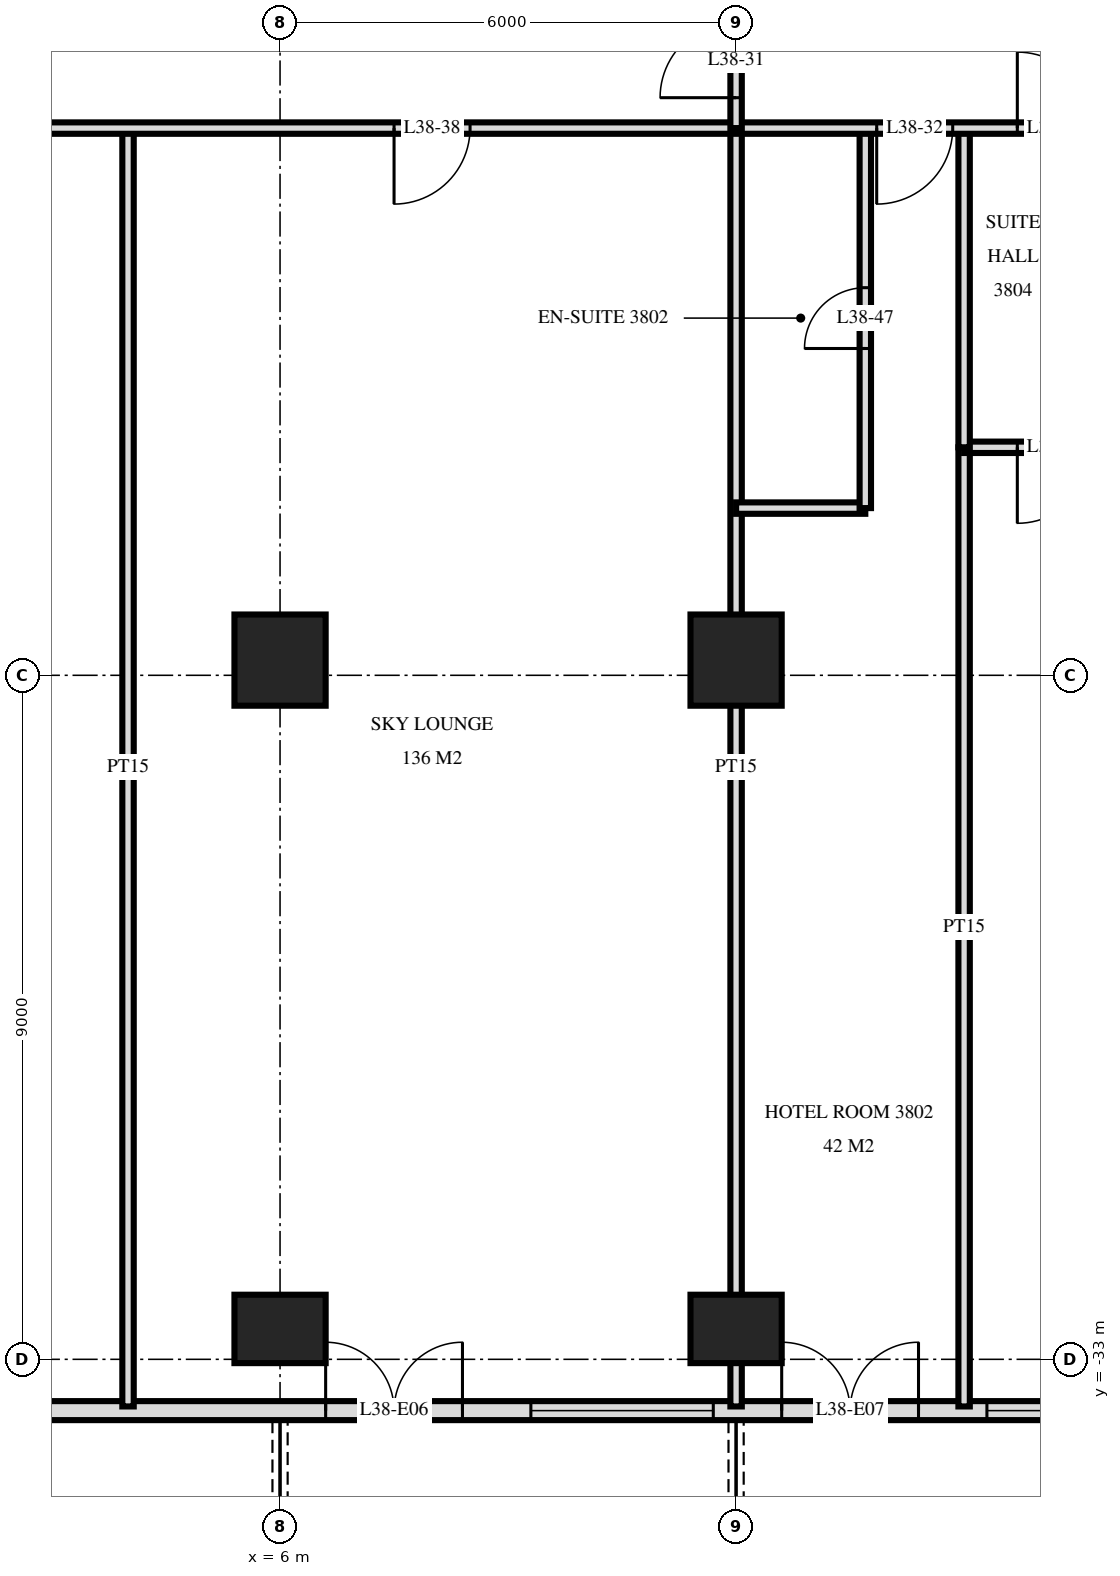
"""IFC4 building model, lengths in metres.
Left out: names, types, materials, properties, quantities, classifications, styles, units other than length and angle.
Written with IfcOpenShell. Run it as: python <this file> out.ifc"""

import sys

from ifc_helpers import new_model, si_unit, direction, frame, frame_2d, origin, origin_2d, place, context, subcontext, project, spatial, rectangle, extrude, element, fill, save


model = new_model("IFC4")
c1 = context("Model", 3, precision=1e-05, world=origin(), true_north=direction((0.0, 1.0)))
c2 = subcontext(c1, "Body", "Model", "MODEL_VIEW")
j1 = project(units=[si_unit("LENGTHUNIT", "METRE"), si_unit("PLANEANGLEUNIT", "RADIAN")], contexts=[c1])
p1 = place(None, origin())
s1 = spatial("IfcSite", under=j1, at=p1, CompositionType="ELEMENT")
p2 = place(p1, origin())
s2 = spatial("IfcBuilding", under=s1, at=p2, CompositionType="ELEMENT")
p3 = place(p2, frame((0.0, 0.0, 148.8)))
s3 = spatial("IfcBuildingStorey", under=s2, at=p3, CompositionType="ELEMENT", Elevation=148.8)
p4 = place(p3, frame((6.0, -32.6, 0.0), z_axis=(0.0, 0.0, 1.0), x_axis=(1.0, 0.0, 0.0)))
e1 = element("IfcColumn", 1, at=p4, inside=s3, PredefinedType="COLUMN", context=c2, shape_type="SweptSolid", body=[
    extrude(rectangle(XDim=1.2, YDim=0.9, at=origin_2d()), origin(), (0.0, 0.0, 1.0), 3.6),
])
p5 = place(p3, frame((6.0, -23.8, 0.0), z_axis=(0.0, 0.0, 1.0), x_axis=(1.0, 0.0, 0.0)))
e2 = element("IfcColumn", 2, at=p5, inside=s3, PredefinedType="COLUMN", context=c2, shape_type="SweptSolid", body=[
    extrude(rectangle(XDim=1.2, YDim=1.2, at=origin_2d()), origin(), (0.0, 0.0, 1.0), 3.6),
])
p6 = place(p3, frame((12.0, -32.6, 0.0), z_axis=(0.0, 0.0, 1.0), x_axis=(1.0, 0.0, 0.0)))
e3 = element("IfcColumn", 3, at=p6, inside=s3, PredefinedType="COLUMN", context=c2, shape_type="SweptSolid", body=[
    extrude(rectangle(XDim=1.2, YDim=0.9, at=origin_2d()), origin(), (0.0, 0.0, 1.0), 3.6),
])
p7 = place(p3, frame((12.0, -23.8, 0.0), z_axis=(0.0, 0.0, 1.0), x_axis=(1.0, 0.0, 0.0)))
e4 = element("IfcColumn", 4, at=p7, inside=s3, PredefinedType="COLUMN", context=c2, shape_type="SweptSolid", body=[
    extrude(rectangle(XDim=1.2, YDim=1.2, at=origin_2d()), origin(), (0.0, 0.0, 1.0), 3.6),
])
p8 = place(p3, frame((-23.675, -33.675, 0.0), z_axis=(0.0, 0.0, 1.0), x_axis=(1.0, 0.0, 0.0)))
e5 = element("IfcWall", 5, at=p8, inside=s3, PredefinedType="SOLIDWALL", context=c2, shape_type="SweptSolid", body=[
    extrude(rectangle(XDim=47.351, YDim=0.25, at=frame_2d((23.675, 0.0))), origin(), (0.0, 0.0, 1.0), 3.32),
])
p9 = place(p8, frame((3.425, 0.0, 0.0)))
e6 = element("IfcOpeningElement", 6, at=p9, cuts=e5, PredefinedType="OPENING", context=c2, shape_type="SweptSolid", body=[
    extrude(rectangle(XDim=1.8, YDim=2.4, at=frame_2d((0.9, 1.2))), frame((0.0, 0.135, 0.0), z_axis=(0.0, -1.0, 0.0), x_axis=(1.0, 0.0, 0.0)), (0.0, 0.0, 1.0), 0.27),
])
p10 = place(p8, frame((6.275, 0.0, 0.0)))
e7 = element("IfcOpeningElement", 7, at=p10, cuts=e5, PredefinedType="OPENING", context=c2, shape_type="SweptSolid", body=[
    extrude(rectangle(XDim=1.8, YDim=2.4, at=frame_2d((0.9, 1.2))), frame((0.0, 0.135, 0.0), z_axis=(0.0, -1.0, 0.0), x_axis=(1.0, 0.0, 0.0)), (0.0, 0.0, 1.0), 0.27),
])
p11 = place(p8, frame((8.975, 0.0, 0.3)))
e8 = element("IfcOpeningElement", 8, at=p11, cuts=e5, PredefinedType="OPENING", context=c2, shape_type="SweptSolid", body=[
    extrude(rectangle(XDim=2.4, YDim=2.1, at=frame_2d((1.2, 1.05))), frame((0.0, 0.135, 0.0), z_axis=(0.0, -1.0, 0.0), x_axis=(1.0, 0.0, 0.0)), (0.0, 0.0, 1.0), 0.27),
])
p12 = place(p8, frame((12.275, 0.0, 0.0)))
e9 = element("IfcOpeningElement", 9, at=p12, cuts=e5, PredefinedType="OPENING", context=c2, shape_type="SweptSolid", body=[
    extrude(rectangle(XDim=1.8, YDim=2.4, at=frame_2d((0.9, 1.2))), frame((0.0, 0.135, 0.0), z_axis=(0.0, -1.0, 0.0), x_axis=(1.0, 0.0, 0.0)), (0.0, 0.0, 1.0), 0.27),
])
p13 = place(p8, frame((14.975, 0.0, 0.3)))
e10 = element("IfcOpeningElement", 10, at=p13, cuts=e5, PredefinedType="OPENING", context=c2, shape_type="SweptSolid", body=[
    extrude(rectangle(XDim=2.4, YDim=2.1, at=frame_2d((1.2, 1.05))), frame((0.0, 0.135, 0.0), z_axis=(0.0, -1.0, 0.0), x_axis=(1.0, 0.0, 0.0)), (0.0, 0.0, 1.0), 0.27),
])
p14 = place(p8, frame((21.275, 0.0, 0.0)))
e11 = element("IfcOpeningElement", 11, at=p14, cuts=e5, PredefinedType="OPENING", context=c2, shape_type="SweptSolid", body=[
    extrude(rectangle(XDim=1.8, YDim=2.4, at=frame_2d((0.9, 1.2))), frame((0.0, 0.135, 0.0), z_axis=(0.0, -1.0, 0.0), x_axis=(1.0, 0.0, 0.0)), (0.0, 0.0, 1.0), 0.27),
])
p15 = place(p8, frame((24.275, 0.0, 0.0)))
e12 = element("IfcOpeningElement", 12, at=p15, cuts=e5, PredefinedType="OPENING", context=c2, shape_type="SweptSolid", body=[
    extrude(rectangle(XDim=1.8, YDim=2.4, at=frame_2d((0.9, 1.2))), frame((0.0, 0.135, 0.0), z_axis=(0.0, -1.0, 0.0), x_axis=(1.0, 0.0, 0.0)), (0.0, 0.0, 1.0), 0.27),
])
p16 = place(p8, frame((30.275, 0.0, 0.0)))
e13 = element("IfcOpeningElement", 13, at=p16, cuts=e5, PredefinedType="OPENING", context=c2, shape_type="SweptSolid", body=[
    extrude(rectangle(XDim=1.8, YDim=2.4, at=frame_2d((0.9, 1.2))), frame((0.0, 0.135, 0.0), z_axis=(0.0, -1.0, 0.0), x_axis=(1.0, 0.0, 0.0)), (0.0, 0.0, 1.0), 0.27),
])
p17 = place(p8, frame((32.975, 0.0, 0.3)))
e14 = element("IfcOpeningElement", 14, at=p17, cuts=e5, PredefinedType="OPENING", context=c2, shape_type="SweptSolid", body=[
    extrude(rectangle(XDim=2.4, YDim=2.1, at=frame_2d((1.2, 1.05))), frame((0.0, 0.135, 0.0), z_axis=(0.0, -1.0, 0.0), x_axis=(1.0, 0.0, 0.0)), (0.0, 0.0, 1.0), 0.27),
])
p18 = place(p8, frame((36.275, 0.0, 0.0)))
e15 = element("IfcOpeningElement", 15, at=p18, cuts=e5, PredefinedType="OPENING", context=c2, shape_type="SweptSolid", body=[
    extrude(rectangle(XDim=1.8, YDim=2.4, at=frame_2d((0.9, 1.2))), frame((0.0, 0.135, 0.0), z_axis=(0.0, -1.0, 0.0), x_axis=(1.0, 0.0, 0.0)), (0.0, 0.0, 1.0), 0.27),
])
p19 = place(p8, frame((38.975, 0.0, 0.3)))
e16 = element("IfcOpeningElement", 16, at=p19, cuts=e5, PredefinedType="OPENING", context=c2, shape_type="SweptSolid", body=[
    extrude(rectangle(XDim=2.4, YDim=2.1, at=frame_2d((1.2, 1.05))), frame((0.0, 0.135, 0.0), z_axis=(0.0, -1.0, 0.0), x_axis=(1.0, 0.0, 0.0)), (0.0, 0.0, 1.0), 0.27),
])
p20 = place(p8, frame((42.275, 0.0, 0.0)))
e17 = element("IfcOpeningElement", 17, at=p20, cuts=e5, PredefinedType="OPENING", context=c2, shape_type="SweptSolid", body=[
    extrude(rectangle(XDim=1.8, YDim=2.4, at=frame_2d((0.9, 1.2))), frame((0.0, 0.135, 0.0), z_axis=(0.0, -1.0, 0.0), x_axis=(1.0, 0.0, 0.0)), (0.0, 0.0, 1.0), 0.27),
])
p21 = place(p8, frame((45.125, 0.0, 0.3)))
e18 = element("IfcOpeningElement", 18, at=p21, cuts=e5, PredefinedType="OPENING", context=c2, shape_type="SweptSolid", body=[
    extrude(rectangle(XDim=1.8, YDim=2.1, at=frame_2d((0.9, 1.05))), frame((0.0, 0.135, 0.0), z_axis=(0.0, -1.0, 0.0), x_axis=(1.0, 0.0, 0.0)), (0.0, 0.0, 1.0), 0.27),
])
p22 = place(p3, frame((15.0, -21.0, 0.0), z_axis=(0.0, 0.0, 1.0), x_axis=(0.0, 1.0, 0.0)))
e19 = element("IfcWall", 19, at=p22, inside=s3, PredefinedType="PARTITIONING", context=c2, shape_type="SweptSolid", body=[
    extrude(rectangle(XDim=4.2, YDim=0.15, at=frame_2d((2.1, 0.0))), origin(), (0.0, 0.0, 1.0), 3.32),
])
p23 = place(p3, frame((15.0, -33.62, 0.0), z_axis=(0.0, 0.0, 1.0), x_axis=(0.0, 1.0, 0.0)))
e20 = element("IfcWall", 20, at=p23, inside=s3, PredefinedType="PARTITIONING", context=c2, shape_type="SweptSolid", body=[
    extrude(rectangle(XDim=12.62, YDim=0.15, at=frame_2d((6.31, 0.0))), origin(), (0.0, 0.0, 1.0), 3.32),
])
p24 = place(p3, frame((13.7, -21.8, 0.0), z_axis=(0.0, 0.0, 1.0), x_axis=(0.0, 1.0, 0.0)))
e21 = element("IfcWall", 21, at=p24, inside=s3, PredefinedType="PARTITIONING", context=c2, shape_type="SweptSolid", body=[
    extrude(rectangle(XDim=5.0, YDim=0.15, at=frame_2d((2.5, 0.0))), origin(), (0.0, 0.0, 1.0), 3.32),
])
p25 = place(p24, frame((2.1, 0.0, 0.0)))
e22 = element("IfcOpeningElement", 22, at=p25, cuts=e21, PredefinedType="OPENING", context=c2, shape_type="SweptSolid", body=[
    extrude(rectangle(XDim=0.8, YDim=2.1, at=frame_2d((0.4, 1.05))), frame((0.0, 0.085, 0.0), z_axis=(0.0, -1.0, 0.0), x_axis=(1.0, 0.0, 0.0)), (0.0, 0.0, 1.0), 0.17),
])
p26 = place(p3, frame((12.0, -16.8, 0.0), z_axis=(0.0, 0.0, 1.0), x_axis=(0.0, 1.0, 0.0)))
e23 = element("IfcWall", 23, at=p26, inside=s3, PredefinedType="PARTITIONING", context=c2, shape_type="SweptSolid", body=[
    extrude(rectangle(XDim=1.75, YDim=0.15, at=frame_2d((0.875, 0.0))), origin(), (0.0, 0.0, 1.0), 3.32),
])
p27 = place(p26, frame((0.4, 0.0, 0.0)))
e24 = element("IfcOpeningElement", 24, at=p27, cuts=e23, PredefinedType="OPENING", context=c2, shape_type="SweptSolid", body=[
    extrude(rectangle(XDim=1.0, YDim=2.1, at=frame_2d((0.5, 1.05))), frame((0.0, 0.085, 0.0), z_axis=(0.0, -1.0, 0.0), x_axis=(1.0, 0.0, 0.0)), (0.0, 0.0, 1.0), 0.17),
])
for number, where, z_axis, x_axis in (
    (25, (12.0, -33.62, 0.0), (0.0, 0.0, 1.0), (0.0, 1.0, 0.0)),
    (26, (4.0, -33.62, 0.0), (0.0, 0.0, 1.0), (0.0, 1.0, 0.0)),
):
    element("IfcWall", number, at=place(p3, frame(where, z_axis=z_axis, x_axis=x_axis)), inside=s3, PredefinedType="PARTITIONING", context=c2, shape_type="SweptSolid", body=[
        extrude(rectangle(XDim=16.82, YDim=0.15, at=frame_2d((8.41, 0.0))), origin(), (0.0, 0.0, 1.0), 3.32),
    ])
p28 = place(p3, frame((12.0, -21.8, 0.0), z_axis=(0.0, 0.0, 1.0), x_axis=(1.0, 0.0, 0.0)))
e27 = element("IfcWall", 27, at=p28, inside=s3, PredefinedType="PARTITIONING", context=c2, shape_type="SweptSolid", body=[
    extrude(rectangle(XDim=1.7, YDim=0.15, at=frame_2d((0.85, 0.0))), origin(), (0.0, 0.0, 1.0), 3.32),
])
p29 = place(p3, frame((15.0, -21.0, 0.0), z_axis=(0.0, 0.0, 1.0), x_axis=(1.0, 0.0, 0.0)))
e28 = element("IfcWall", 28, at=p29, inside=s3, PredefinedType="PARTITIONING", context=c2, shape_type="SweptSolid", body=[
    extrude(rectangle(XDim=2.4, YDim=0.15, at=frame_2d((1.2, 0.0))), origin(), (0.0, 0.0, 1.0), 3.32),
])
p30 = place(p29, frame((0.7, 0.0, 0.0)))
e29 = element("IfcOpeningElement", 29, at=p30, cuts=e28, PredefinedType="OPENING", context=c2, shape_type="SweptSolid", body=[
    extrude(rectangle(XDim=1.0, YDim=2.1, at=frame_2d((0.5, 1.05))), frame((0.0, 0.085, 0.0), z_axis=(0.0, -1.0, 0.0), x_axis=(1.0, 0.0, 0.0)), (0.0, 0.0, 1.0), 0.17),
])
p31 = place(p3, frame((-28.02, -16.8, 0.0), z_axis=(0.0, 0.0, 1.0), x_axis=(1.0, 0.0, 0.0)))
e30 = element("IfcWall", 30, at=p31, inside=s3, PredefinedType="PARTITIONING", context=c2, shape_type="SweptSolid", body=[
    extrude(rectangle(XDim=56.04, YDim=0.15, at=frame_2d((28.02, 0.0))), origin(), (0.0, 0.0, 1.0), 3.32),
])
p32 = place(p31, frame((13.17, 0.0, 0.0)))
e31 = element("IfcOpeningElement", 31, at=p32, cuts=e30, PredefinedType="OPENING", context=c2, shape_type="SweptSolid", body=[
    extrude(rectangle(XDim=1.0, YDim=2.1, at=frame_2d((0.5, 1.05))), frame((0.0, 0.085, 0.0), z_axis=(0.0, -1.0, 0.0), x_axis=(1.0, 0.0, 0.0)), (0.0, 0.0, 1.0), 0.17),
])
p33 = place(p31, frame((11.32, 0.0, 0.0)))
e32 = element("IfcOpeningElement", 32, at=p33, cuts=e30, PredefinedType="OPENING", context=c2, shape_type="SweptSolid", body=[
    extrude(rectangle(XDim=1.0, YDim=2.1, at=frame_2d((0.5, 1.05))), frame((0.0, 0.085, 0.0), z_axis=(0.0, -1.0, 0.0), x_axis=(1.0, 0.0, 0.0)), (0.0, 0.0, 1.0), 0.17),
])
p34 = place(p31, frame((41.87, 0.0, 0.0)))
e33 = element("IfcOpeningElement", 33, at=p34, cuts=e30, PredefinedType="OPENING", context=c2, shape_type="SweptSolid", body=[
    extrude(rectangle(XDim=1.0, YDim=2.1, at=frame_2d((0.5, 1.05))), frame((0.0, 0.085, 0.0), z_axis=(0.0, -1.0, 0.0), x_axis=(1.0, 0.0, 0.0)), (0.0, 0.0, 1.0), 0.17),
])
p35 = place(p31, frame((43.72, 0.0, 0.0)))
e34 = element("IfcOpeningElement", 34, at=p35, cuts=e30, PredefinedType="OPENING", context=c2, shape_type="SweptSolid", body=[
    extrude(rectangle(XDim=1.0, YDim=2.1, at=frame_2d((0.5, 1.05))), frame((0.0, 0.085, 0.0), z_axis=(0.0, -1.0, 0.0), x_axis=(1.0, 0.0, 0.0)), (0.0, 0.0, 1.0), 0.17),
])
p36 = place(p31, frame((19.52, 0.0, 0.0)))
e35 = element("IfcOpeningElement", 35, at=p36, cuts=e30, PredefinedType="OPENING", context=c2, shape_type="SweptSolid", body=[
    extrude(rectangle(XDim=1.0, YDim=2.1, at=frame_2d((0.5, 1.05))), frame((0.0, 0.085, 0.0), z_axis=(0.0, -1.0, 0.0), x_axis=(1.0, 0.0, 0.0)), (0.0, 0.0, 1.0), 0.17),
])
p37 = place(p31, frame((27.52, 0.0, 0.0)))
e36 = element("IfcOpeningElement", 36, at=p37, cuts=e30, PredefinedType="OPENING", context=c2, shape_type="SweptSolid", body=[
    extrude(rectangle(XDim=1.0, YDim=2.1, at=frame_2d((0.5, 1.05))), frame((0.0, 0.085, 0.0), z_axis=(0.0, -1.0, 0.0), x_axis=(1.0, 0.0, 0.0)), (0.0, 0.0, 1.0), 0.17),
])
p38 = place(p31, frame((35.52, 0.0, 0.0)))
e37 = element("IfcOpeningElement", 37, at=p38, cuts=e30, PredefinedType="OPENING", context=c2, shape_type="SweptSolid", body=[
    extrude(rectangle(XDim=1.0, YDim=2.1, at=frame_2d((0.5, 1.05))), frame((0.0, 0.085, 0.0), z_axis=(0.0, -1.0, 0.0), x_axis=(1.0, 0.0, 0.0)), (0.0, 0.0, 1.0), 0.17),
])
p39 = place(p16, origin())
e38 = element("IfcDoor", 38, at=p39, inside=s3, OperationType="DOUBLE_DOOR_SINGLE_SWING", PredefinedType="DOOR", context=c2, shape_type="SweptSolid", body=[
    extrude(rectangle(XDim=1.8, YDim=2.4, at=frame_2d((0.9, 1.2))), frame((0.0, 0.025, 0.0), z_axis=(0.0, -1.0, 0.0), x_axis=(1.0, 0.0, 0.0)), (0.0, 0.0, 1.0), 0.05),
])
fill(e13, e38)
p40 = place(p17, origin())
e39 = element("IfcWindow", 39, at=p40, inside=s3, PartitioningType="SINGLE_PANEL", PredefinedType="WINDOW", context=c2, shape_type="SweptSolid", body=[
    extrude(rectangle(XDim=2.4, YDim=2.1, at=frame_2d((1.2, 1.05))), frame((0.0, 0.03, 0.0), z_axis=(0.0, -1.0, 0.0), x_axis=(1.0, 0.0, 0.0)), (0.0, 0.0, 1.0), 0.06),
])
fill(e14, e39)
p41 = place(p18, origin())
e40 = element("IfcDoor", 40, at=p41, inside=s3, OperationType="DOUBLE_DOOR_SINGLE_SWING", PredefinedType="DOOR", context=c2, shape_type="SweptSolid", body=[
    extrude(rectangle(XDim=1.8, YDim=2.4, at=frame_2d((0.9, 1.2))), frame((0.0, 0.025, 0.0), z_axis=(0.0, -1.0, 0.0), x_axis=(1.0, 0.0, 0.0)), (0.0, 0.0, 1.0), 0.05),
])
fill(e15, e40)
p42 = place(p19, origin())
e41 = element("IfcWindow", 41, at=p42, inside=s3, PartitioningType="SINGLE_PANEL", PredefinedType="WINDOW", context=c2, shape_type="SweptSolid", body=[
    extrude(rectangle(XDim=2.4, YDim=2.1, at=frame_2d((1.2, 1.05))), frame((0.0, 0.03, 0.0), z_axis=(0.0, -1.0, 0.0), x_axis=(1.0, 0.0, 0.0)), (0.0, 0.0, 1.0), 0.06),
])
fill(e16, e41)
p43 = place(p27, origin())
e42 = element("IfcDoor", 42, at=p43, inside=s3, OperationType="SINGLE_SWING_RIGHT", PredefinedType="DOOR", context=c2, shape_type="SweptSolid", body=[
    extrude(rectangle(XDim=1.0, YDim=2.1, at=frame_2d((0.5, 1.05))), frame((0.0, 0.025, 0.0), z_axis=(0.0, -1.0, 0.0), x_axis=(1.0, 0.0, 0.0)), (0.0, 0.0, 1.0), 0.05),
])
fill(e24, e42)
p44 = place(p34, frame((0.5, 0.0, 0.0), z_axis=(0.0, 0.0, 1.0), x_axis=(-1.0, 0.0, 0.0)))
e43 = element("IfcDoor", 43, at=p44, inside=s3, OperationType="SINGLE_SWING_LEFT", PredefinedType="DOOR", context=c2, shape_type="SweptSolid", body=[
    extrude(rectangle(XDim=1.0, YDim=2.1, at=frame_2d((0.0, 1.05))), frame((0.0, -0.025, 0.0), z_axis=(0.0, 1.0, 0.0), x_axis=(-1.0, 0.0, 0.0)), (0.0, 0.0, 1.0), 0.05),
])
fill(e33, e43)
p45 = place(p35, origin())
e44 = element("IfcDoor", 44, at=p45, inside=s3, OperationType="SINGLE_SWING_RIGHT", PredefinedType="DOOR", context=c2, shape_type="SweptSolid", body=[
    extrude(rectangle(XDim=1.0, YDim=2.1, at=frame_2d((0.5, 1.05))), frame((0.0, 0.025, 0.0), z_axis=(0.0, -1.0, 0.0), x_axis=(1.0, 0.0, 0.0)), (0.0, 0.0, 1.0), 0.05),
])
fill(e34, e44)
p46 = place(p38, frame((0.5, 0.0, 0.0), z_axis=(0.0, 0.0, 1.0), x_axis=(-1.0, 0.0, 0.0)))
e45 = element("IfcDoor", 45, at=p46, inside=s3, OperationType="SINGLE_SWING_LEFT", PredefinedType="DOOR", context=c2, shape_type="SweptSolid", body=[
    extrude(rectangle(XDim=1.0, YDim=2.1, at=frame_2d((0.0, 1.05))), frame((0.0, -0.025, 0.0), z_axis=(0.0, 1.0, 0.0), x_axis=(-1.0, 0.0, 0.0)), (0.0, 0.0, 1.0), 0.05),
])
fill(e37, e45)
p47 = place(p25, origin())
e46 = element("IfcDoor", 46, at=p47, inside=s3, OperationType="SINGLE_SWING_RIGHT", PredefinedType="DOOR", context=c2, shape_type="SweptSolid", body=[
    extrude(rectangle(XDim=0.8, YDim=2.1, at=frame_2d((0.4, 1.05))), frame((0.0, 0.025, 0.0), z_axis=(0.0, -1.0, 0.0), x_axis=(1.0, 0.0, 0.0)), (0.0, 0.0, 1.0), 0.05),
])
fill(e22, e46)
p48 = place(p30, frame((0.5, 0.0, 0.0), z_axis=(0.0, 0.0, 1.0), x_axis=(-1.0, 0.0, 0.0)))
e47 = element("IfcDoor", 47, at=p48, inside=s3, OperationType="SINGLE_SWING_LEFT", PredefinedType="DOOR", context=c2, shape_type="SweptSolid", body=[
    extrude(rectangle(XDim=1.0, YDim=2.1, at=frame_2d((0.0, 1.05))), frame((0.0, -0.025, 0.0), z_axis=(0.0, 1.0, 0.0), x_axis=(-1.0, 0.0, 0.0)), (0.0, 0.0, 1.0), 0.05),
])
fill(e29, e47)
save(model, sys.argv[1])
